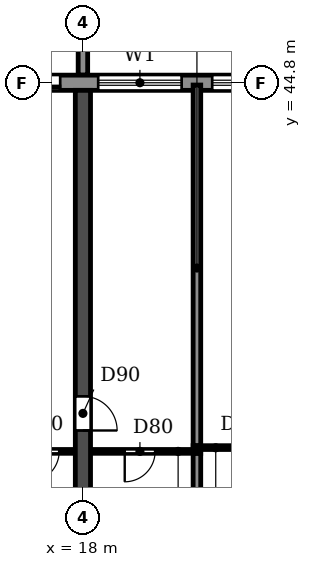
"""IFC4 building model, lengths in metres.
Left out: names, types, materials, properties, quantities, classifications, styles, units other than length and angle.
Written with IfcOpenShell. Run it as: python <this file> out.ifc"""

import sys

from ifc_helpers import new_model, si_unit, direction, frame, frame_2d, origin, place, context, subcontext, project, spatial, polyline, rectangle, outline, extrude, source, transform, mapped, element, fill, save


model = new_model("IFC4")
c1 = context("Model", 3, precision=1e-05, world=origin(), true_north=direction((0.0, 1.0)))
c2 = subcontext(c1, "Body", "Model", "MODEL_VIEW")
j1 = project(units=[si_unit("LENGTHUNIT", "METRE"), si_unit("PLANEANGLEUNIT", "RADIAN")], contexts=[c1])
p1 = place(None, origin())
s1 = spatial("IfcSite", under=j1, at=p1, CompositionType="ELEMENT")
p2 = place(p1, origin())
s2 = spatial("IfcBuilding", under=s1, at=p2, CompositionType="ELEMENT")
p3 = place(p2, frame((0.0, 0.0, 33.3)))
s3 = spatial("IfcBuildingStorey", under=s2, at=p3, CompositionType="ELEMENT", Elevation=33.3)
p4 = place(p3, frame((18.0, 30.55, 0.0), z_axis=(0.0, 0.0, 1.0), x_axis=(0.0, 1.0, 0.0)))
e1 = element("IfcWall", 1, at=p4, inside=s3, PredefinedType="SHEAR", context=c2, shape_type="SweptSolid", body=[
    extrude(rectangle(XDim=14.05, YDim=0.4, at=frame_2d((7.025, 0.0))), origin(), (0.0, 0.0, 1.0), 3.05),
])
p5 = place(p4, frame((5.1, 0.0, 0.0)))
e2 = element("IfcOpeningElement", 2, at=p5, cuts=e1, PredefinedType="OPENING", context=c2, shape_type="SweptSolid", body=[
    extrude(rectangle(XDim=0.9, YDim=2.1, at=frame_2d((0.45, 1.05))), frame((0.0, 0.21, 0.0), z_axis=(0.0, -1.0, 0.0), x_axis=(1.0, 0.0, 0.0)), (0.0, 0.0, 1.0), 0.42),
])
p6 = place(p3, frame((97.317, 44.8, 0.0), z_axis=(0.0, 0.0, 1.0), x_axis=(-1.0, 0.0, 0.0)))
e3 = element("IfcWall", 3, at=p6, inside=s3, PredefinedType="STANDARD", context=c2, shape_type="SweptSolid", body=[
    extrude(rectangle(XDim=92.634, YDim=0.4, at=frame_2d((46.317, 0.0))), origin(), (0.0, 0.0, 1.0), 3.05),
])
p7 = place(p6, frame((88.717, 0.0, 0.9)))
e4 = element("IfcOpeningElement", 4, at=p7, cuts=e3, PredefinedType="OPENING", context=c2, shape_type="SweptSolid", body=[
    extrude(rectangle(XDim=2.2, YDim=1.5, at=frame_2d((1.1, 0.75))), frame((0.0, 0.21, 0.0), z_axis=(0.0, -1.0, 0.0), x_axis=(1.0, 0.0, 0.0)), (0.0, 0.0, 1.0), 0.42),
])
p8 = place(p6, frame((85.917, 0.0, 0.0)))
e5 = element("IfcOpeningElement", 5, at=p8, cuts=e3, PredefinedType="OPENING", context=c2, shape_type="SweptSolid", body=[
    extrude(rectangle(XDim=1.8, YDim=2.4, at=frame_2d((0.9, 1.2))), frame((0.0, 0.21, 0.0), z_axis=(0.0, -1.0, 0.0), x_axis=(1.0, 0.0, 0.0)), (0.0, 0.0, 1.0), 0.42),
])
p9 = place(p6, frame((82.717, 0.0, 0.9)))
e6 = element("IfcOpeningElement", 6, at=p9, cuts=e3, PredefinedType="OPENING", context=c2, shape_type="SweptSolid", body=[
    extrude(rectangle(XDim=2.2, YDim=1.5, at=frame_2d((1.1, 0.75))), frame((0.0, 0.21, 0.0), z_axis=(0.0, -1.0, 0.0), x_axis=(1.0, 0.0, 0.0)), (0.0, 0.0, 1.0), 0.42),
])
p10 = place(p6, frame((79.917, 0.0, 0.0)))
e7 = element("IfcOpeningElement", 7, at=p10, cuts=e3, PredefinedType="OPENING", context=c2, shape_type="SweptSolid", body=[
    extrude(rectangle(XDim=1.8, YDim=2.4, at=frame_2d((0.9, 1.2))), frame((0.0, 0.21, 0.0), z_axis=(0.0, -1.0, 0.0), x_axis=(1.0, 0.0, 0.0)), (0.0, 0.0, 1.0), 0.42),
])
p11 = place(p6, frame((76.717, 0.0, 0.9)))
e8 = element("IfcOpeningElement", 8, at=p11, cuts=e3, PredefinedType="OPENING", context=c2, shape_type="SweptSolid", body=[
    extrude(rectangle(XDim=2.2, YDim=1.5, at=frame_2d((1.1, 0.75))), frame((0.0, 0.21, 0.0), z_axis=(0.0, -1.0, 0.0), x_axis=(1.0, 0.0, 0.0)), (0.0, 0.0, 1.0), 0.42),
])
p12 = place(p6, frame((73.717, 0.0, 0.9)))
e9 = element("IfcOpeningElement", 9, at=p12, cuts=e3, PredefinedType="OPENING", context=c2, shape_type="SweptSolid", body=[
    extrude(rectangle(XDim=2.2, YDim=1.5, at=frame_2d((1.1, 0.75))), frame((0.0, 0.21, 0.0), z_axis=(0.0, -1.0, 0.0), x_axis=(1.0, 0.0, 0.0)), (0.0, 0.0, 1.0), 0.42),
])
p13 = place(p6, frame((70.717, 0.0, 0.9)))
e10 = element("IfcOpeningElement", 10, at=p13, cuts=e3, PredefinedType="OPENING", context=c2, shape_type="SweptSolid", body=[
    extrude(rectangle(XDim=2.2, YDim=1.5, at=frame_2d((1.1, 0.75))), frame((0.0, 0.21, 0.0), z_axis=(0.0, -1.0, 0.0), x_axis=(1.0, 0.0, 0.0)), (0.0, 0.0, 1.0), 0.42),
])
p14 = place(p6, frame((67.917, 0.0, 0.0)))
e11 = element("IfcOpeningElement", 11, at=p14, cuts=e3, PredefinedType="OPENING", context=c2, shape_type="SweptSolid", body=[
    extrude(rectangle(XDim=1.8, YDim=2.4, at=frame_2d((0.9, 1.2))), frame((0.0, 0.21, 0.0), z_axis=(0.0, -1.0, 0.0), x_axis=(1.0, 0.0, 0.0)), (0.0, 0.0, 1.0), 0.42),
])
p15 = place(p6, frame((64.717, 0.0, 0.9)))
e12 = element("IfcOpeningElement", 12, at=p15, cuts=e3, PredefinedType="OPENING", context=c2, shape_type="SweptSolid", body=[
    extrude(rectangle(XDim=2.2, YDim=1.5, at=frame_2d((1.1, 0.75))), frame((0.0, 0.21, 0.0), z_axis=(0.0, -1.0, 0.0), x_axis=(1.0, 0.0, 0.0)), (0.0, 0.0, 1.0), 0.42),
])
p16 = place(p6, frame((61.717, 0.0, 0.9)))
e13 = element("IfcOpeningElement", 13, at=p16, cuts=e3, PredefinedType="OPENING", context=c2, shape_type="SweptSolid", body=[
    extrude(rectangle(XDim=2.2, YDim=1.5, at=frame_2d((1.1, 0.75))), frame((0.0, 0.21, 0.0), z_axis=(0.0, -1.0, 0.0), x_axis=(1.0, 0.0, 0.0)), (0.0, 0.0, 1.0), 0.42),
])
p17 = place(p6, frame((58.717, 0.0, 0.9)))
e14 = element("IfcOpeningElement", 14, at=p17, cuts=e3, PredefinedType="OPENING", context=c2, shape_type="SweptSolid", body=[
    extrude(rectangle(XDim=2.2, YDim=1.5, at=frame_2d((1.1, 0.75))), frame((0.0, 0.21, 0.0), z_axis=(0.0, -1.0, 0.0), x_axis=(1.0, 0.0, 0.0)), (0.0, 0.0, 1.0), 0.42),
])
p18 = place(p6, frame((55.917, 0.0, 0.0)))
e15 = element("IfcOpeningElement", 15, at=p18, cuts=e3, PredefinedType="OPENING", context=c2, shape_type="SweptSolid", body=[
    extrude(rectangle(XDim=1.8, YDim=2.4, at=frame_2d((0.9, 1.2))), frame((0.0, 0.21, 0.0), z_axis=(0.0, -1.0, 0.0), x_axis=(1.0, 0.0, 0.0)), (0.0, 0.0, 1.0), 0.42),
])
p19 = place(p6, frame((52.717, 0.0, 0.9)))
e16 = element("IfcOpeningElement", 16, at=p19, cuts=e3, PredefinedType="OPENING", context=c2, shape_type="SweptSolid", body=[
    extrude(rectangle(XDim=2.2, YDim=1.5, at=frame_2d((1.1, 0.75))), frame((0.0, 0.21, 0.0), z_axis=(0.0, -1.0, 0.0), x_axis=(1.0, 0.0, 0.0)), (0.0, 0.0, 1.0), 0.42),
])
p20 = place(p6, frame((49.717, 0.0, 0.9)))
e17 = element("IfcOpeningElement", 17, at=p20, cuts=e3, PredefinedType="OPENING", context=c2, shape_type="SweptSolid", body=[
    extrude(rectangle(XDim=2.2, YDim=1.5, at=frame_2d((1.1, 0.75))), frame((0.0, 0.21, 0.0), z_axis=(0.0, -1.0, 0.0), x_axis=(1.0, 0.0, 0.0)), (0.0, 0.0, 1.0), 0.42),
])
p21 = place(p6, frame((46.717, 0.0, 0.9)))
e18 = element("IfcOpeningElement", 18, at=p21, cuts=e3, PredefinedType="OPENING", context=c2, shape_type="SweptSolid", body=[
    extrude(rectangle(XDim=2.2, YDim=1.5, at=frame_2d((1.1, 0.75))), frame((0.0, 0.21, 0.0), z_axis=(0.0, -1.0, 0.0), x_axis=(1.0, 0.0, 0.0)), (0.0, 0.0, 1.0), 0.42),
])
p22 = place(p6, frame((43.917, 0.0, 0.0)))
e19 = element("IfcOpeningElement", 19, at=p22, cuts=e3, PredefinedType="OPENING", context=c2, shape_type="SweptSolid", body=[
    extrude(rectangle(XDim=1.8, YDim=2.4, at=frame_2d((0.9, 1.2))), frame((0.0, 0.21, 0.0), z_axis=(0.0, -1.0, 0.0), x_axis=(1.0, 0.0, 0.0)), (0.0, 0.0, 1.0), 0.42),
])
p23 = place(p6, frame((40.717, 0.0, 0.9)))
e20 = element("IfcOpeningElement", 20, at=p23, cuts=e3, PredefinedType="OPENING", context=c2, shape_type="SweptSolid", body=[
    extrude(rectangle(XDim=2.2, YDim=1.5, at=frame_2d((1.1, 0.75))), frame((0.0, 0.21, 0.0), z_axis=(0.0, -1.0, 0.0), x_axis=(1.0, 0.0, 0.0)), (0.0, 0.0, 1.0), 0.42),
])
p24 = place(p6, frame((37.717, 0.0, 0.9)))
e21 = element("IfcOpeningElement", 21, at=p24, cuts=e3, PredefinedType="OPENING", context=c2, shape_type="SweptSolid", body=[
    extrude(rectangle(XDim=2.2, YDim=1.5, at=frame_2d((1.1, 0.75))), frame((0.0, 0.21, 0.0), z_axis=(0.0, -1.0, 0.0), x_axis=(1.0, 0.0, 0.0)), (0.0, 0.0, 1.0), 0.42),
])
p25 = place(p6, frame((34.717, 0.0, 0.9)))
e22 = element("IfcOpeningElement", 22, at=p25, cuts=e3, PredefinedType="OPENING", context=c2, shape_type="SweptSolid", body=[
    extrude(rectangle(XDim=2.2, YDim=1.5, at=frame_2d((1.1, 0.75))), frame((0.0, 0.21, 0.0), z_axis=(0.0, -1.0, 0.0), x_axis=(1.0, 0.0, 0.0)), (0.0, 0.0, 1.0), 0.42),
])
p26 = place(p6, frame((31.917, 0.0, 0.0)))
e23 = element("IfcOpeningElement", 23, at=p26, cuts=e3, PredefinedType="OPENING", context=c2, shape_type="SweptSolid", body=[
    extrude(rectangle(XDim=1.8, YDim=2.4, at=frame_2d((0.9, 1.2))), frame((0.0, 0.21, 0.0), z_axis=(0.0, -1.0, 0.0), x_axis=(1.0, 0.0, 0.0)), (0.0, 0.0, 1.0), 0.42),
])
p27 = place(p6, frame((28.717, 0.0, 0.9)))
e24 = element("IfcOpeningElement", 24, at=p27, cuts=e3, PredefinedType="OPENING", context=c2, shape_type="SweptSolid", body=[
    extrude(rectangle(XDim=2.2, YDim=1.5, at=frame_2d((1.1, 0.75))), frame((0.0, 0.21, 0.0), z_axis=(0.0, -1.0, 0.0), x_axis=(1.0, 0.0, 0.0)), (0.0, 0.0, 1.0), 0.42),
])
p28 = place(p6, frame((25.717, 0.0, 0.9)))
e25 = element("IfcOpeningElement", 25, at=p28, cuts=e3, PredefinedType="OPENING", context=c2, shape_type="SweptSolid", body=[
    extrude(rectangle(XDim=2.2, YDim=1.5, at=frame_2d((1.1, 0.75))), frame((0.0, 0.21, 0.0), z_axis=(0.0, -1.0, 0.0), x_axis=(1.0, 0.0, 0.0)), (0.0, 0.0, 1.0), 0.42),
])
p29 = place(p6, frame((22.917, 0.0, 0.0)))
e26 = element("IfcOpeningElement", 26, at=p29, cuts=e3, PredefinedType="OPENING", context=c2, shape_type="SweptSolid", body=[
    extrude(rectangle(XDim=1.8, YDim=2.4, at=frame_2d((0.9, 1.2))), frame((0.0, 0.21, 0.0), z_axis=(0.0, -1.0, 0.0), x_axis=(1.0, 0.0, 0.0)), (0.0, 0.0, 1.0), 0.42),
])
p30 = place(p6, frame((19.717, 0.0, 0.9)))
e27 = element("IfcOpeningElement", 27, at=p30, cuts=e3, PredefinedType="OPENING", context=c2, shape_type="SweptSolid", body=[
    extrude(rectangle(XDim=2.2, YDim=1.5, at=frame_2d((1.1, 0.75))), frame((0.0, 0.21, 0.0), z_axis=(0.0, -1.0, 0.0), x_axis=(1.0, 0.0, 0.0)), (0.0, 0.0, 1.0), 0.42),
])
p31 = place(p6, frame((16.717, 0.0, 0.9)))
e28 = element("IfcOpeningElement", 28, at=p31, cuts=e3, PredefinedType="OPENING", context=c2, shape_type="SweptSolid", body=[
    extrude(rectangle(XDim=2.2, YDim=1.5, at=frame_2d((1.1, 0.75))), frame((0.0, 0.21, 0.0), z_axis=(0.0, -1.0, 0.0), x_axis=(1.0, 0.0, 0.0)), (0.0, 0.0, 1.0), 0.42),
])
p32 = place(p6, frame((13.917, 0.0, 0.0)))
e29 = element("IfcOpeningElement", 29, at=p32, cuts=e3, PredefinedType="OPENING", context=c2, shape_type="SweptSolid", body=[
    extrude(rectangle(XDim=1.8, YDim=2.4, at=frame_2d((0.9, 1.2))), frame((0.0, 0.21, 0.0), z_axis=(0.0, -1.0, 0.0), x_axis=(1.0, 0.0, 0.0)), (0.0, 0.0, 1.0), 0.42),
])
p33 = place(p6, frame((10.717, 0.0, 0.9)))
e30 = element("IfcOpeningElement", 30, at=p33, cuts=e3, PredefinedType="OPENING", context=c2, shape_type="SweptSolid", body=[
    extrude(rectangle(XDim=2.2, YDim=1.5, at=frame_2d((1.1, 0.75))), frame((0.0, 0.21, 0.0), z_axis=(0.0, -1.0, 0.0), x_axis=(1.0, 0.0, 0.0)), (0.0, 0.0, 1.0), 0.42),
])
p34 = place(p6, frame((7.917, 0.0, 0.0)))
e31 = element("IfcOpeningElement", 31, at=p34, cuts=e3, PredefinedType="OPENING", context=c2, shape_type="SweptSolid", body=[
    extrude(rectangle(XDim=1.8, YDim=2.4, at=frame_2d((0.9, 1.2))), frame((0.0, 0.21, 0.0), z_axis=(0.0, -1.0, 0.0), x_axis=(1.0, 0.0, 0.0)), (0.0, 0.0, 1.0), 0.42),
])
p35 = place(p6, frame((4.717, 0.0, 0.9)))
e32 = element("IfcOpeningElement", 32, at=p35, cuts=e3, PredefinedType="OPENING", context=c2, shape_type="SweptSolid", body=[
    extrude(rectangle(XDim=2.2, YDim=1.5, at=frame_2d((1.1, 0.75))), frame((0.0, 0.21, 0.0), z_axis=(0.0, -1.0, 0.0), x_axis=(1.0, 0.0, 0.0)), (0.0, 0.0, 1.0), 0.42),
])
p36 = place(p6, frame((1.917, 0.0, 0.0)))
e33 = element("IfcOpeningElement", 33, at=p36, cuts=e3, PredefinedType="OPENING", context=c2, shape_type="SweptSolid", body=[
    extrude(rectangle(XDim=1.8, YDim=2.4, at=frame_2d((0.9, 1.2))), frame((0.0, 0.21, 0.0), z_axis=(0.0, -1.0, 0.0), x_axis=(1.0, 0.0, 0.0)), (0.0, 0.0, 1.0), 0.42),
])
m1 = source(origin(), c2, "Body", "SweptSolid", [
    extrude(outline(polyline([(0.0, 0.0), (0.25, 0.0), (0.25, 3.1), (0.0, 3.1), (0.0, 0.0)])), origin(), (0.0, 0.0, 1.0), 3.1),
])
p37 = place(p3, frame((17.875, 45.0, 0.0)))
e34 = element("IfcWall", 34, at=p37, inside=s3, PredefinedType="STANDARD", context=c2, shape_type="MappedRepresentation", body=[
    mapped(m1, transform((0.0, 0.0, 0.0))),
])
p38 = place(p3, frame((21.0, 30.56, 0.0), z_axis=(0.0, 0.0, 1.0), x_axis=(0.0, 1.0, 0.0)))
e35 = element("IfcWall", 35, at=p38, inside=s3, PredefinedType="PARTITIONING", context=c2, shape_type="SweptSolid", body=[
    extrude(rectangle(XDim=4.49, YDim=0.2, at=frame_2d((2.245, 0.0))), origin(), (0.0, 0.0, 1.0), 3.05),
])
p39 = place(p3, frame((21.0, 35.25, 0.0), z_axis=(0.0, 0.0, 1.0), x_axis=(0.0, 1.0, 0.0)))
e36 = element("IfcWall", 36, at=p39, inside=s3, PredefinedType="PARTITIONING", context=c2, shape_type="SweptSolid", body=[
    extrude(rectangle(XDim=9.49, YDim=0.2, at=frame_2d((4.745, 0.0))), origin(), (0.0, 0.0, 1.0), 3.05),
])
p40 = place(p3, frame((15.9, 35.1, 0.0), z_axis=(0.0, 0.0, 1.0), x_axis=(1.0, 0.0, 0.0)))
e37 = element("IfcWall", 37, at=p40, inside=s3, PredefinedType="PARTITIONING", context=c2, shape_type="SweptSolid", body=[
    extrude(rectangle(XDim=1.89, YDim=0.1, at=frame_2d((0.945, 0.0))), origin(), (0.0, 0.0, 1.0), 3.05),
])
p41 = place(p40, frame((0.675, 0.0, 0.0)))
e38 = element("IfcOpeningElement", 38, at=p41, cuts=e37, PredefinedType="OPENING", context=c2, shape_type="SweptSolid", body=[
    extrude(rectangle(XDim=0.8, YDim=2.1, at=frame_2d((0.4, 1.05))), frame((0.0, 0.06, 0.0), z_axis=(0.0, -1.0, 0.0), x_axis=(1.0, 0.0, 0.0)), (0.0, 0.0, 1.0), 0.12),
])
p42 = place(p3, frame((18.21, 35.1, 0.0), z_axis=(0.0, 0.0, 1.0), x_axis=(1.0, 0.0, 0.0)))
e39 = element("IfcWall", 39, at=p42, inside=s3, PredefinedType="PARTITIONING", context=c2, shape_type="SweptSolid", body=[
    extrude(rectangle(XDim=2.89, YDim=0.1, at=frame_2d((1.445, 0.0))), origin(), (0.0, 0.0, 1.0), 3.05),
])
p43 = place(p42, frame((0.89, 0.0, 0.0)))
e40 = element("IfcOpeningElement", 40, at=p43, cuts=e39, PredefinedType="OPENING", context=c2, shape_type="SweptSolid", body=[
    extrude(rectangle(XDim=0.8, YDim=2.1, at=frame_2d((0.4, 1.05))), frame((0.0, 0.06, 0.0), z_axis=(0.0, -1.0, 0.0), x_axis=(1.0, 0.0, 0.0)), (0.0, 0.0, 1.0), 0.12),
])
p44 = place(p3, frame((20.9, 35.2, 0.0), z_axis=(0.0, 0.0, 1.0), x_axis=(1.0, 0.0, 0.0)))
e41 = element("IfcWall", 41, at=p44, inside=s3, PredefinedType="PARTITIONING", context=c2, shape_type="SweptSolid", body=[
    extrude(rectangle(XDim=2.89, YDim=0.1, at=frame_2d((1.445, 0.0))), origin(), (0.0, 0.0, 1.0), 3.05),
])
p45 = place(p44, frame((1.2, 0.0, 0.0)))
e42 = element("IfcOpeningElement", 42, at=p45, cuts=e41, PredefinedType="OPENING", context=c2, shape_type="SweptSolid", body=[
    extrude(rectangle(XDim=0.8, YDim=2.1, at=frame_2d((0.4, 1.05))), frame((0.0, 0.06, 0.0), z_axis=(0.0, -1.0, 0.0), x_axis=(1.0, 0.0, 0.0)), (0.0, 0.0, 1.0), 0.12),
])
p46 = place(p10, origin())
e43 = element("IfcDoor", 43, at=p46, inside=s3, OperationType="DOUBLE_DOOR_SLIDING", PredefinedType="DOOR", context=c2, shape_type="SweptSolid", body=[
    extrude(rectangle(XDim=1.8, YDim=2.4, at=frame_2d((0.9, 1.2))), frame((0.0, 0.025, 0.0), z_axis=(0.0, -1.0, 0.0), x_axis=(1.0, 0.0, 0.0)), (0.0, 0.0, 1.0), 0.05),
])
fill(e7, e43)
p47 = place(p11, origin())
e44 = element("IfcWindow", 44, at=p47, inside=s3, PartitioningType="DOUBLE_PANEL_HORIZONTAL", PredefinedType="WINDOW", context=c2, shape_type="SweptSolid", body=[
    extrude(rectangle(XDim=2.2, YDim=1.5, at=frame_2d((1.1, 0.75))), frame((0.0, 0.03, 0.0), z_axis=(0.0, -1.0, 0.0), x_axis=(1.0, 0.0, 0.0)), (0.0, 0.0, 1.0), 0.06),
])
fill(e8, e44)
p48 = place(p12, origin())
e45 = element("IfcWindow", 45, at=p48, inside=s3, PartitioningType="DOUBLE_PANEL_HORIZONTAL", PredefinedType="WINDOW", context=c2, shape_type="SweptSolid", body=[
    extrude(rectangle(XDim=2.2, YDim=1.5, at=frame_2d((1.1, 0.75))), frame((0.0, 0.03, 0.0), z_axis=(0.0, -1.0, 0.0), x_axis=(1.0, 0.0, 0.0)), (0.0, 0.0, 1.0), 0.06),
])
fill(e9, e45)
p49 = place(p43, frame((0.8, 0.0, 0.0), z_axis=(0.0, 0.0, 1.0), x_axis=(-1.0, 0.0, 0.0)))
e46 = element("IfcDoor", 46, at=p49, inside=s3, OperationType="SINGLE_SWING_RIGHT", PredefinedType="DOOR", context=c2, shape_type="SweptSolid", body=[
    extrude(rectangle(XDim=0.8, YDim=2.1, at=frame_2d((0.4, 1.05))), frame((0.0, 0.025, 0.0), z_axis=(0.0, -1.0, 0.0), x_axis=(1.0, 0.0, 0.0)), (0.0, 0.0, 1.0), 0.05),
])
fill(e40, e46)
p50 = place(p41, frame((0.8, 0.0, 0.0), z_axis=(0.0, 0.0, 1.0), x_axis=(-1.0, 0.0, 0.0)))
e47 = element("IfcDoor", 47, at=p50, inside=s3, OperationType="SINGLE_SWING_RIGHT", PredefinedType="DOOR", context=c2, shape_type="SweptSolid", body=[
    extrude(rectangle(XDim=0.8, YDim=2.1, at=frame_2d((0.4, 1.05))), frame((0.0, 0.025, 0.0), z_axis=(0.0, -1.0, 0.0), x_axis=(1.0, 0.0, 0.0)), (0.0, 0.0, 1.0), 0.05),
])
fill(e38, e47)
p51 = place(p5, frame((0.9, 0.0, 0.0), z_axis=(0.0, 0.0, 1.0), x_axis=(-1.0, 0.0, 0.0)))
e48 = element("IfcDoor", 48, at=p51, inside=s3, OperationType="SINGLE_SWING_RIGHT", PredefinedType="DOOR", context=c2, shape_type="SweptSolid", body=[
    extrude(rectangle(XDim=0.9, YDim=2.1, at=frame_2d((0.45, 1.05))), frame((0.0, 0.025, 0.0), z_axis=(0.0, -1.0, 0.0), x_axis=(1.0, 0.0, 0.0)), (0.0, 0.0, 1.0), 0.05),
])
fill(e2, e48)
save(model, sys.argv[1])
